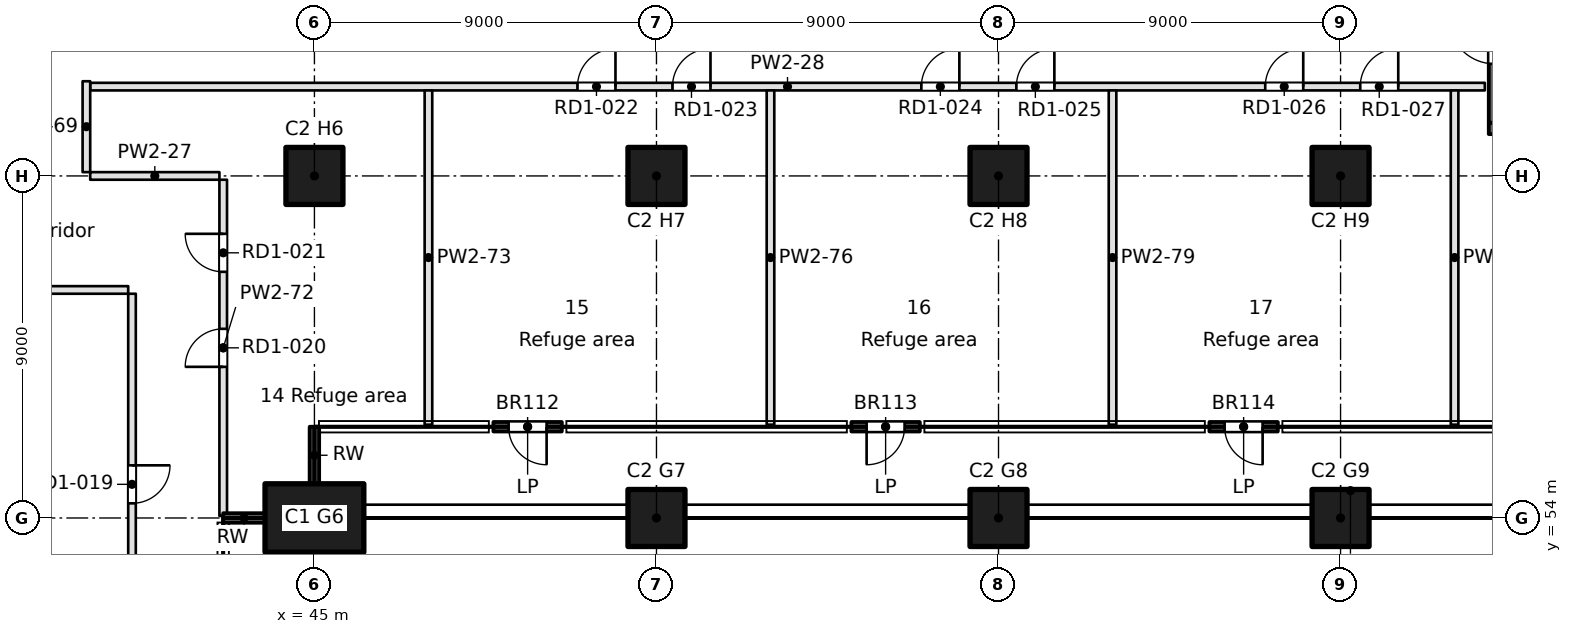
"""IFC4 building model, lengths in metres.
Left out: names, types, materials, properties, quantities, classifications, styles, units other than length and angle.
Written with IfcOpenShell. Run it as: python <this file> out.ifc"""

import sys

from ifc_helpers import new_model, si_unit, direction, frame, frame_2d, origin, origin_2d, place, context, subcontext, project, spatial, rectangle, extrude, element, fill, save


model = new_model("IFC4")
c1 = context("Model", 3, precision=1e-05, world=origin(), true_north=direction((0.0, 1.0)))
c2 = subcontext(c1, "Body", "Model", "MODEL_VIEW")
j1 = project(units=[si_unit("LENGTHUNIT", "METRE"), si_unit("PLANEANGLEUNIT", "RADIAN")], contexts=[c1])
p1 = place(None, origin())
s1 = spatial("IfcSite", under=j1, at=p1, CompositionType="ELEMENT")
p2 = place(p1, origin())
s2 = spatial("IfcBuilding", under=s1, at=p2, CompositionType="ELEMENT")
p3 = place(p2, frame((0.0, 0.0, 31.2)))
s3 = spatial("IfcBuildingStorey", under=s2, at=p3, CompositionType="ELEMENT", Elevation=31.2)
p4 = place(p3, frame((45.0, 54.0, 0.0), z_axis=(0.0, 0.0, 1.0), x_axis=(1.0, 0.0, 0.0)))
e1 = element("IfcColumn", 1, at=p4, inside=s3, PredefinedType="COLUMN", context=c2, shape_type="SweptSolid", body=[
    extrude(rectangle(XDim=2.6, YDim=1.8, at=origin_2d()), origin(), (0.0, 0.0, 1.0), 4.6),
])
for number, where, z_axis, x_axis in (
    (2, (54.0, 54.0, 0.0), (0.0, 0.0, 1.0), (1.0, 0.0, 0.0)),
    (3, (63.0, 54.0, 0.0), (0.0, 0.0, 1.0), (1.0, 0.0, 0.0)),
    (4, (72.0, 54.0, 0.0), (0.0, 0.0, 1.0), (1.0, 0.0, 0.0)),
    (5, (45.0, 63.0, 0.0), (0.0, 0.0, 1.0), (1.0, 0.0, 0.0)),
    (6, (54.0, 63.0, 0.0), (0.0, 0.0, 1.0), (1.0, 0.0, 0.0)),
    (7, (63.0, 63.0, 0.0), (0.0, 0.0, 1.0), (1.0, 0.0, 0.0)),
    (8, (72.0, 63.0, 0.0), (0.0, 0.0, 1.0), (1.0, 0.0, 0.0)),
):
    element("IfcColumn", number, at=place(p3, frame(where, z_axis=z_axis, x_axis=x_axis)), inside=s3, PredefinedType="COLUMN", context=c2, shape_type="SweptSolid", body=[
        extrude(rectangle(XDim=1.5, YDim=1.5, at=origin_2d()), origin(), (0.0, 0.0, 1.0), 4.6),
    ])
p5 = place(p3, frame((42.599, 54.0, 0.0), z_axis=(0.0, 0.0, 1.0), x_axis=(0.999999901628, 0.000443557286, 0.0)))
e9 = element("IfcWall", 9, at=p5, inside=s3, PredefinedType="SOLIDWALL", context=c2, shape_type="SweptSolid", body=[
    extrude(rectangle(XDim=1.101, YDim=0.25, at=frame_2d((0.55, 0.0))), origin(), (0.0, 0.0, 1.0), 4.2),
])
p6 = place(p3, frame((44.999, 54.9, 0.0), z_axis=(0.0, 0.0, 1.0), x_axis=(0.00016265452, 0.999999986772, 0.0)))
e10 = element("IfcWall", 10, at=p6, inside=s3, PredefinedType="SOLIDWALL", context=c2, shape_type="SweptSolid", body=[
    extrude(rectangle(XDim=1.501, YDim=0.25, at=frame_2d((0.75, 0.0))), origin(), (0.0, 0.0, 1.0), 4.2),
])
p7 = place(p3, frame((49.709, 56.401, 0.0), z_axis=(0.0, 0.0, 1.0), x_axis=(1.0, 0.0, 0.0)))
e11 = element("IfcWall", 11, at=p7, inside=s3, PredefinedType="SOLIDWALL", context=c2, shape_type="SweptSolid", body=[
    extrude(rectangle(XDim=1.8, YDim=0.25, at=frame_2d((0.9, 0.0))), origin(), (0.0, 0.0, 1.0), 4.2),
])
p8 = place(p7, frame((0.4, 0.0, 0.0)))
e12 = element("IfcOpeningElement", 12, at=p8, cuts=e11, PredefinedType="OPENING", context=c2, shape_type="SweptSolid", body=[
    extrude(rectangle(XDim=1.0, YDim=2.1, at=frame_2d((0.5, 1.05))), frame((0.0, 0.125, 0.0), z_axis=(0.0, -1.0, 0.0), x_axis=(1.0, 0.0, 0.0)), (0.0, 0.0, 1.0), 0.25),
])
p9 = place(p3, frame((59.129, 56.401, 0.0), z_axis=(0.0, 0.0, 1.0), x_axis=(1.0, 0.0, 0.0)))
e13 = element("IfcWall", 13, at=p9, inside=s3, PredefinedType="SOLIDWALL", context=c2, shape_type="SweptSolid", body=[
    extrude(rectangle(XDim=1.8, YDim=0.25, at=frame_2d((0.9, 0.0))), origin(), (0.0, 0.0, 1.0), 4.2),
])
p10 = place(p9, frame((0.4, 0.0, 0.0)))
e14 = element("IfcOpeningElement", 14, at=p10, cuts=e13, PredefinedType="OPENING", context=c2, shape_type="SweptSolid", body=[
    extrude(rectangle(XDim=1.0, YDim=2.1, at=frame_2d((0.5, 1.05))), frame((0.0, 0.125, 0.0), z_axis=(0.0, -1.0, 0.0), x_axis=(1.0, 0.0, 0.0)), (0.0, 0.0, 1.0), 0.25),
])
p11 = place(p3, frame((68.549, 56.401, 0.0), z_axis=(0.0, 0.0, 1.0), x_axis=(1.0, 0.0, 0.0)))
e15 = element("IfcWall", 15, at=p11, inside=s3, PredefinedType="SOLIDWALL", context=c2, shape_type="SweptSolid", body=[
    extrude(rectangle(XDim=1.8, YDim=0.25, at=frame_2d((0.9, 0.0))), origin(), (0.0, 0.0, 1.0), 4.2),
])
p12 = place(p11, frame((0.4, 0.0, 0.0)))
e16 = element("IfcOpeningElement", 16, at=p12, cuts=e15, PredefinedType="OPENING", context=c2, shape_type="SweptSolid", body=[
    extrude(rectangle(XDim=1.0, YDim=2.1, at=frame_2d((0.5, 1.05))), frame((0.0, 0.125, 0.0), z_axis=(0.0, -1.0, 0.0), x_axis=(1.0, 0.0, 0.0)), (0.0, 0.0, 1.0), 0.25),
])
p13 = place(p3, frame((75.9, 64.25, -0.45), z_axis=(0.0, 0.0, 1.0), x_axis=(1.0, 0.0, 0.0)))
e17 = element("IfcWall", 17, at=p13, inside=s3, PredefinedType="SOLIDWALL", context=c2, shape_type="SweptSolid", body=[
    extrude(rectangle(XDim=8.2, YDim=0.3, at=frame_2d((4.1, 0.0))), origin(), (0.0, 0.0, 1.0), 4.65),
])
p14 = place(p3, frame((76.05, 64.4, -0.45), z_axis=(0.0, 0.0, 1.0), x_axis=(0.0, 1.0, 0.0)))
e18 = element("IfcWall", 18, at=p14, inside=s3, PredefinedType="SOLIDWALL", context=c2, shape_type="SweptSolid", body=[
    extrude(rectangle(XDim=4.3, YDim=0.3, at=frame_2d((2.15, 0.0))), origin(), (0.0, 0.0, 1.0), 4.65),
])
p15 = place(p14, frame((1.55, 0.0, 0.45)))
e19 = element("IfcOpeningElement", 19, at=p15, cuts=e18, PredefinedType="OPENING", context=c2, shape_type="SweptSolid", body=[
    extrude(rectangle(XDim=1.2, YDim=2.1, at=frame_2d((0.6, 1.05))), frame((0.0, 0.15, 0.0), z_axis=(0.0, -1.0, 0.0), x_axis=(1.0, 0.0, 0.0)), (0.0, 0.0, 1.0), 0.3),
])
p16 = place(p3, frame((40.1, 60.0, 0.0), z_axis=(0.0, 0.0, 1.0), x_axis=(-1.0, 0.0, 0.0)))
e20 = element("IfcWall", 20, at=p16, inside=s3, PredefinedType="PARTITIONING", context=c2, shape_type="SweptSolid", body=[
    extrude(rectangle(XDim=13.853, YDim=0.2, at=frame_2d((6.926, 0.0))), origin(), (0.0, 0.0, 1.0), 4.2),
])
p17 = place(p3, frame((39.1, 63.0, 0.0), z_axis=(0.0, 0.0, 1.0), x_axis=(1.0, 0.0, 0.0)))
e21 = element("IfcWall", 21, at=p17, inside=s3, PredefinedType="PARTITIONING", context=c2, shape_type="SweptSolid", body=[
    extrude(rectangle(XDim=3.4, YDim=0.2, at=frame_2d((1.7, 0.0))), origin(), (0.0, 0.0, 1.0), 4.2),
])
p18 = place(p3, frame((75.796, 65.35, 0.0), z_axis=(0.0, 0.0, 1.0), x_axis=(-1.0, 0.0, 0.0)))
e22 = element("IfcWall", 22, at=p18, inside=s3, PredefinedType="PARTITIONING", context=c2, shape_type="SweptSolid", body=[
    extrude(rectangle(XDim=36.696, YDim=0.2, at=frame_2d((18.348, 0.0))), origin(), (0.0, 0.0, 1.0), 4.2),
])
p19 = place(p18, frame((22.875, 0.0, 0.0)))
e23 = element("IfcOpeningElement", 23, at=p19, cuts=e22, PredefinedType="OPENING", context=c2, shape_type="SweptSolid", body=[
    extrude(rectangle(XDim=1.0, YDim=2.1, at=frame_2d((0.5, 1.05))), frame((0.0, 0.1, 0.0), z_axis=(0.0, -1.0, 0.0), x_axis=(1.0, 0.0, 0.0)), (0.0, 0.0, 1.0), 0.2),
])
p20 = place(p18, frame((20.375, 0.0, 0.0)))
e24 = element("IfcOpeningElement", 24, at=p20, cuts=e22, PredefinedType="OPENING", context=c2, shape_type="SweptSolid", body=[
    extrude(rectangle(XDim=1.0, YDim=2.1, at=frame_2d((0.5, 1.05))), frame((0.0, 0.1, 0.0), z_axis=(0.0, -1.0, 0.0), x_axis=(1.0, 0.0, 0.0)), (0.0, 0.0, 1.0), 0.2),
])
p21 = place(p18, frame((13.826, 0.0, 0.0)))
e25 = element("IfcOpeningElement", 25, at=p21, cuts=e22, PredefinedType="OPENING", context=c2, shape_type="SweptSolid", body=[
    extrude(rectangle(XDim=1.0, YDim=2.1, at=frame_2d((0.5, 1.05))), frame((0.0, 0.1, 0.0), z_axis=(0.0, -1.0, 0.0), x_axis=(1.0, 0.0, 0.0)), (0.0, 0.0, 1.0), 0.2),
])
p22 = place(p18, frame((11.326, 0.0, 0.0)))
e26 = element("IfcOpeningElement", 26, at=p22, cuts=e22, PredefinedType="OPENING", context=c2, shape_type="SweptSolid", body=[
    extrude(rectangle(XDim=1.0, YDim=2.1, at=frame_2d((0.5, 1.05))), frame((0.0, 0.1, 0.0), z_axis=(0.0, -1.0, 0.0), x_axis=(1.0, 0.0, 0.0)), (0.0, 0.0, 1.0), 0.2),
])
p23 = place(p18, frame((4.778, 0.0, 0.0)))
e27 = element("IfcOpeningElement", 27, at=p23, cuts=e22, PredefinedType="OPENING", context=c2, shape_type="SweptSolid", body=[
    extrude(rectangle(XDim=1.0, YDim=2.1, at=frame_2d((0.5, 1.05))), frame((0.0, 0.1, 0.0), z_axis=(0.0, -1.0, 0.0), x_axis=(1.0, 0.0, 0.0)), (0.0, 0.0, 1.0), 0.2),
])
p24 = place(p18, frame((2.278, 0.0, 0.0)))
e28 = element("IfcOpeningElement", 28, at=p24, cuts=e22, PredefinedType="OPENING", context=c2, shape_type="SweptSolid", body=[
    extrude(rectangle(XDim=1.0, YDim=2.1, at=frame_2d((0.5, 1.05))), frame((0.0, 0.1, 0.0), z_axis=(0.0, -1.0, 0.0), x_axis=(1.0, 0.0, 0.0)), (0.0, 0.0, 1.0), 0.2),
])
p25 = place(p3, frame((39.0, 65.491, 0.0), z_axis=(0.0, 0.0, 1.0), x_axis=(0.0, -1.0, 0.0)))
e29 = element("IfcWall", 29, at=p25, inside=s3, PredefinedType="PARTITIONING", context=c2, shape_type="SweptSolid", body=[
    extrude(rectangle(XDim=2.391, YDim=0.2, at=frame_2d((1.196, 0.0))), origin(), (0.0, 0.0, 1.0), 4.2),
])
p26 = place(p3, frame((40.2, 19.322, 0.0), z_axis=(0.0, 0.0, 1.0), x_axis=(0.0, 1.0, 0.0)))
e30 = element("IfcWall", 30, at=p26, inside=s3, PredefinedType="PARTITIONING", context=c2, shape_type="SweptSolid", body=[
    extrude(rectangle(XDim=40.578, YDim=0.2, at=frame_2d((20.289, 0.0))), origin(), (0.0, 0.0, 1.0), 4.2),
])
p27 = place(p26, frame((3.383, 0.0, 0.0)))
e31 = element("IfcOpeningElement", 31, at=p27, cuts=e30, PredefinedType="OPENING", context=c2, shape_type="SweptSolid", body=[
    extrude(rectangle(XDim=1.0, YDim=2.1, at=frame_2d((0.5, 1.05))), frame((0.0, 0.1, 0.0), z_axis=(0.0, -1.0, 0.0), x_axis=(1.0, 0.0, 0.0)), (0.0, 0.0, 1.0), 0.2),
])
p28 = place(p26, frame((5.883, 0.0, 0.0)))
e32 = element("IfcOpeningElement", 32, at=p28, cuts=e30, PredefinedType="OPENING", context=c2, shape_type="SweptSolid", body=[
    extrude(rectangle(XDim=1.0, YDim=2.1, at=frame_2d((0.5, 1.05))), frame((0.0, 0.1, 0.0), z_axis=(0.0, -1.0, 0.0), x_axis=(1.0, 0.0, 0.0)), (0.0, 0.0, 1.0), 0.2),
])
p29 = place(p26, frame((11.774, 0.0, 0.0)))
e33 = element("IfcOpeningElement", 33, at=p29, cuts=e30, PredefinedType="OPENING", context=c2, shape_type="SweptSolid", body=[
    extrude(rectangle(XDim=1.0, YDim=2.1, at=frame_2d((0.5, 1.05))), frame((0.0, 0.1, 0.0), z_axis=(0.0, -1.0, 0.0), x_axis=(1.0, 0.0, 0.0)), (0.0, 0.0, 1.0), 0.2),
])
p30 = place(p26, frame((14.274, 0.0, 0.0)))
e34 = element("IfcOpeningElement", 34, at=p30, cuts=e30, PredefinedType="OPENING", context=c2, shape_type="SweptSolid", body=[
    extrude(rectangle(XDim=1.0, YDim=2.1, at=frame_2d((0.5, 1.05))), frame((0.0, 0.1, 0.0), z_axis=(0.0, -1.0, 0.0), x_axis=(1.0, 0.0, 0.0)), (0.0, 0.0, 1.0), 0.2),
])
p31 = place(p26, frame((20.791, 0.0, 0.0)))
e35 = element("IfcOpeningElement", 35, at=p31, cuts=e30, PredefinedType="OPENING", context=c2, shape_type="SweptSolid", body=[
    extrude(rectangle(XDim=1.0, YDim=2.1, at=frame_2d((0.5, 1.05))), frame((0.0, 0.1, 0.0), z_axis=(0.0, -1.0, 0.0), x_axis=(1.0, 0.0, 0.0)), (0.0, 0.0, 1.0), 0.2),
])
p32 = place(p26, frame((23.291, 0.0, 0.0)))
e36 = element("IfcOpeningElement", 36, at=p32, cuts=e30, PredefinedType="OPENING", context=c2, shape_type="SweptSolid", body=[
    extrude(rectangle(XDim=1.0, YDim=2.1, at=frame_2d((0.5, 1.05))), frame((0.0, 0.1, 0.0), z_axis=(0.0, -1.0, 0.0), x_axis=(1.0, 0.0, 0.0)), (0.0, 0.0, 1.0), 0.2),
])
p33 = place(p26, frame((32.564, 0.0, 0.0)))
e37 = element("IfcOpeningElement", 37, at=p33, cuts=e30, PredefinedType="OPENING", context=c2, shape_type="SweptSolid", body=[
    extrude(rectangle(XDim=1.0, YDim=2.1, at=frame_2d((0.5, 1.05))), frame((0.0, 0.1, 0.0), z_axis=(0.0, -1.0, 0.0), x_axis=(1.0, 0.0, 0.0)), (0.0, 0.0, 1.0), 0.2),
])
p34 = place(p26, frame((35.064, 0.0, 0.0)))
e38 = element("IfcOpeningElement", 38, at=p34, cuts=e30, PredefinedType="OPENING", context=c2, shape_type="SweptSolid", body=[
    extrude(rectangle(XDim=1.0, YDim=2.1, at=frame_2d((0.5, 1.05))), frame((0.0, 0.1, 0.0), z_axis=(0.0, -1.0, 0.0), x_axis=(1.0, 0.0, 0.0)), (0.0, 0.0, 1.0), 0.2),
])
p35 = place(p3, frame((42.6, 62.9, 0.0), z_axis=(0.0, 0.0, 1.0), x_axis=(0.0, -1.0, 0.0)))
e39 = element("IfcWall", 39, at=p35, inside=s3, PredefinedType="PARTITIONING", context=c2, shape_type="SweptSolid", body=[
    extrude(rectangle(XDim=8.846, YDim=0.2, at=frame_2d((4.423, 0.0))), origin(), (0.0, 0.0, 1.0), 4.2),
])
p36 = place(p35, frame((3.923, 0.0, 0.0)))
e40 = element("IfcOpeningElement", 40, at=p36, cuts=e39, PredefinedType="OPENING", context=c2, shape_type="SweptSolid", body=[
    extrude(rectangle(XDim=1.0, YDim=2.1, at=frame_2d((0.5, 1.05))), frame((0.0, 0.1, 0.0), z_axis=(0.0, -1.0, 0.0), x_axis=(1.0, 0.0, 0.0)), (0.0, 0.0, 1.0), 0.2),
])
p37 = place(p35, frame((1.423, 0.0, 0.0)))
e41 = element("IfcOpeningElement", 41, at=p37, cuts=e39, PredefinedType="OPENING", context=c2, shape_type="SweptSolid", body=[
    extrude(rectangle(XDim=1.0, YDim=2.1, at=frame_2d((0.5, 1.05))), frame((0.0, 0.1, 0.0), z_axis=(0.0, -1.0, 0.0), x_axis=(1.0, 0.0, 0.0)), (0.0, 0.0, 1.0), 0.2),
])
for number, where, z_axis, x_axis in (
    (42, (48.0, 65.25, 0.0), (0.0, 0.0, 1.0), (0.0, -1.0, 0.0)),
    (43, (57.0, 65.25, 0.0), (0.0, 0.0, 1.0), (0.0, -1.0, 0.0)),
    (44, (66.0, 65.25, 0.0), (0.0, 0.0, 1.0), (0.0, -1.0, 0.0)),
    (45, (75.0, 65.25, 0.0), (0.0, 0.0, 1.0), (0.0, -1.0, 0.0)),
):
    element("IfcWall", number, at=place(p3, frame(where, z_axis=z_axis, x_axis=x_axis)), inside=s3, PredefinedType="PARTITIONING", context=c2, shape_type="SweptSolid", body=[
        extrude(rectangle(XDim=8.795, YDim=0.2, at=frame_2d((4.397, 0.0))), origin(), (0.0, 0.0, 1.0), 4.2),
    ])
p38 = place(p8, frame((1.0, 0.0, 0.0), z_axis=(0.0, 0.0, 1.0), x_axis=(-1.0, 0.0, 0.0)))
e46 = element("IfcDoor", 46, at=p38, inside=s3, OperationType="SINGLE_SWING_LEFT", PredefinedType="DOOR", context=c2, shape_type="SweptSolid", body=[
    extrude(rectangle(XDim=1.0, YDim=2.1, at=frame_2d((0.5, 1.05))), frame((0.0, 0.025, 0.0), z_axis=(0.0, -1.0, 0.0), x_axis=(1.0, 0.0, 0.0)), (0.0, 0.0, 1.0), 0.05),
])
fill(e12, e46)
p39 = place(p10, frame((1.0, 0.0, 0.0), z_axis=(0.0, 0.0, 1.0), x_axis=(-1.0, 0.0, 0.0)))
e47 = element("IfcDoor", 47, at=p39, inside=s3, OperationType="SINGLE_SWING_RIGHT", PredefinedType="DOOR", context=c2, shape_type="SweptSolid", body=[
    extrude(rectangle(XDim=1.0, YDim=2.1, at=frame_2d((0.5, 1.05))), frame((0.0, 0.025, 0.0), z_axis=(0.0, -1.0, 0.0), x_axis=(1.0, 0.0, 0.0)), (0.0, 0.0, 1.0), 0.05),
])
fill(e14, e47)
p40 = place(p12, frame((1.0, 0.0, 0.0), z_axis=(0.0, 0.0, 1.0), x_axis=(-1.0, 0.0, 0.0)))
e48 = element("IfcDoor", 48, at=p40, inside=s3, OperationType="SINGLE_SWING_LEFT", PredefinedType="DOOR", context=c2, shape_type="SweptSolid", body=[
    extrude(rectangle(XDim=1.0, YDim=2.1, at=frame_2d((0.5, 1.05))), frame((0.0, 0.025, 0.0), z_axis=(0.0, -1.0, 0.0), x_axis=(1.0, 0.0, 0.0)), (0.0, 0.0, 1.0), 0.05),
])
fill(e16, e48)
p41 = place(p34, frame((1.0, 0.0, 0.0), z_axis=(0.0, 0.0, 1.0), x_axis=(-1.0, 0.0, 0.0)))
e49 = element("IfcDoor", 49, at=p41, inside=s3, OperationType="SINGLE_SWING_LEFT", PredefinedType="DOOR", context=c2, shape_type="SweptSolid", body=[
    extrude(rectangle(XDim=1.0, YDim=2.1, at=frame_2d((0.5, 1.05))), frame((0.0, 0.025, 0.0), z_axis=(0.0, -1.0, 0.0), x_axis=(1.0, 0.0, 0.0)), (0.0, 0.0, 1.0), 0.05),
])
fill(e38, e49)
p42 = place(p36, frame((1.0, 0.0, 0.0), z_axis=(0.0, 0.0, 1.0), x_axis=(-1.0, 0.0, 0.0)))
e50 = element("IfcDoor", 50, at=p42, inside=s3, OperationType="SINGLE_SWING_LEFT", PredefinedType="DOOR", context=c2, shape_type="SweptSolid", body=[
    extrude(rectangle(XDim=1.0, YDim=2.1, at=frame_2d((0.5, 1.05))), frame((0.0, 0.025, 0.0), z_axis=(0.0, -1.0, 0.0), x_axis=(1.0, 0.0, 0.0)), (0.0, 0.0, 1.0), 0.05),
])
fill(e40, e50)
p43 = place(p37, frame((1.0, 0.0, 0.0), z_axis=(0.0, 0.0, 1.0), x_axis=(-1.0, 0.0, 0.0)))
e51 = element("IfcDoor", 51, at=p43, inside=s3, OperationType="SINGLE_SWING_RIGHT", PredefinedType="DOOR", context=c2, shape_type="SweptSolid", body=[
    extrude(rectangle(XDim=1.0, YDim=2.1, at=frame_2d((0.5, 1.05))), frame((0.0, 0.025, 0.0), z_axis=(0.0, -1.0, 0.0), x_axis=(1.0, 0.0, 0.0)), (0.0, 0.0, 1.0), 0.05),
])
fill(e41, e51)
p44 = place(p19, frame((1.0, 0.0, 0.0), z_axis=(0.0, 0.0, 1.0), x_axis=(-1.0, 0.0, 0.0)))
e52 = element("IfcDoor", 52, at=p44, inside=s3, OperationType="SINGLE_SWING_RIGHT", PredefinedType="DOOR", context=c2, shape_type="SweptSolid", body=[
    extrude(rectangle(XDim=1.0, YDim=2.1, at=frame_2d((0.5, 1.05))), frame((0.0, 0.025, 0.0), z_axis=(0.0, -1.0, 0.0), x_axis=(1.0, 0.0, 0.0)), (0.0, 0.0, 1.0), 0.05),
])
fill(e23, e52)
p45 = place(p20, frame((1.0, 0.0, 0.0), z_axis=(0.0, 0.0, 1.0), x_axis=(-1.0, 0.0, 0.0)))
e53 = element("IfcDoor", 53, at=p45, inside=s3, OperationType="SINGLE_SWING_RIGHT", PredefinedType="DOOR", context=c2, shape_type="SweptSolid", body=[
    extrude(rectangle(XDim=1.0, YDim=2.1, at=frame_2d((0.5, 1.05))), frame((0.0, 0.025, 0.0), z_axis=(0.0, -1.0, 0.0), x_axis=(1.0, 0.0, 0.0)), (0.0, 0.0, 1.0), 0.05),
])
fill(e24, e53)
p46 = place(p21, frame((1.0, 0.0, 0.0), z_axis=(0.0, 0.0, 1.0), x_axis=(-1.0, 0.0, 0.0)))
e54 = element("IfcDoor", 54, at=p46, inside=s3, OperationType="SINGLE_SWING_RIGHT", PredefinedType="DOOR", context=c2, shape_type="SweptSolid", body=[
    extrude(rectangle(XDim=1.0, YDim=2.1, at=frame_2d((0.5, 1.05))), frame((0.0, 0.025, 0.0), z_axis=(0.0, -1.0, 0.0), x_axis=(1.0, 0.0, 0.0)), (0.0, 0.0, 1.0), 0.05),
])
fill(e25, e54)
p47 = place(p22, frame((1.0, 0.0, 0.0), z_axis=(0.0, 0.0, 1.0), x_axis=(-1.0, 0.0, 0.0)))
e55 = element("IfcDoor", 55, at=p47, inside=s3, OperationType="SINGLE_SWING_RIGHT", PredefinedType="DOOR", context=c2, shape_type="SweptSolid", body=[
    extrude(rectangle(XDim=1.0, YDim=2.1, at=frame_2d((0.5, 1.05))), frame((0.0, 0.025, 0.0), z_axis=(0.0, -1.0, 0.0), x_axis=(1.0, 0.0, 0.0)), (0.0, 0.0, 1.0), 0.05),
])
fill(e26, e55)
p48 = place(p23, frame((1.0, 0.0, 0.0), z_axis=(0.0, 0.0, 1.0), x_axis=(-1.0, 0.0, 0.0)))
e56 = element("IfcDoor", 56, at=p48, inside=s3, OperationType="SINGLE_SWING_RIGHT", PredefinedType="DOOR", context=c2, shape_type="SweptSolid", body=[
    extrude(rectangle(XDim=1.0, YDim=2.1, at=frame_2d((0.5, 1.05))), frame((0.0, 0.025, 0.0), z_axis=(0.0, -1.0, 0.0), x_axis=(1.0, 0.0, 0.0)), (0.0, 0.0, 1.0), 0.05),
])
fill(e27, e56)
p49 = place(p24, frame((1.0, 0.0, 0.0), z_axis=(0.0, 0.0, 1.0), x_axis=(-1.0, 0.0, 0.0)))
e57 = element("IfcDoor", 57, at=p49, inside=s3, OperationType="SINGLE_SWING_RIGHT", PredefinedType="DOOR", context=c2, shape_type="SweptSolid", body=[
    extrude(rectangle(XDim=1.0, YDim=2.1, at=frame_2d((0.5, 1.05))), frame((0.0, 0.025, 0.0), z_axis=(0.0, -1.0, 0.0), x_axis=(1.0, 0.0, 0.0)), (0.0, 0.0, 1.0), 0.05),
])
fill(e28, e57)
save(model, sys.argv[1])
